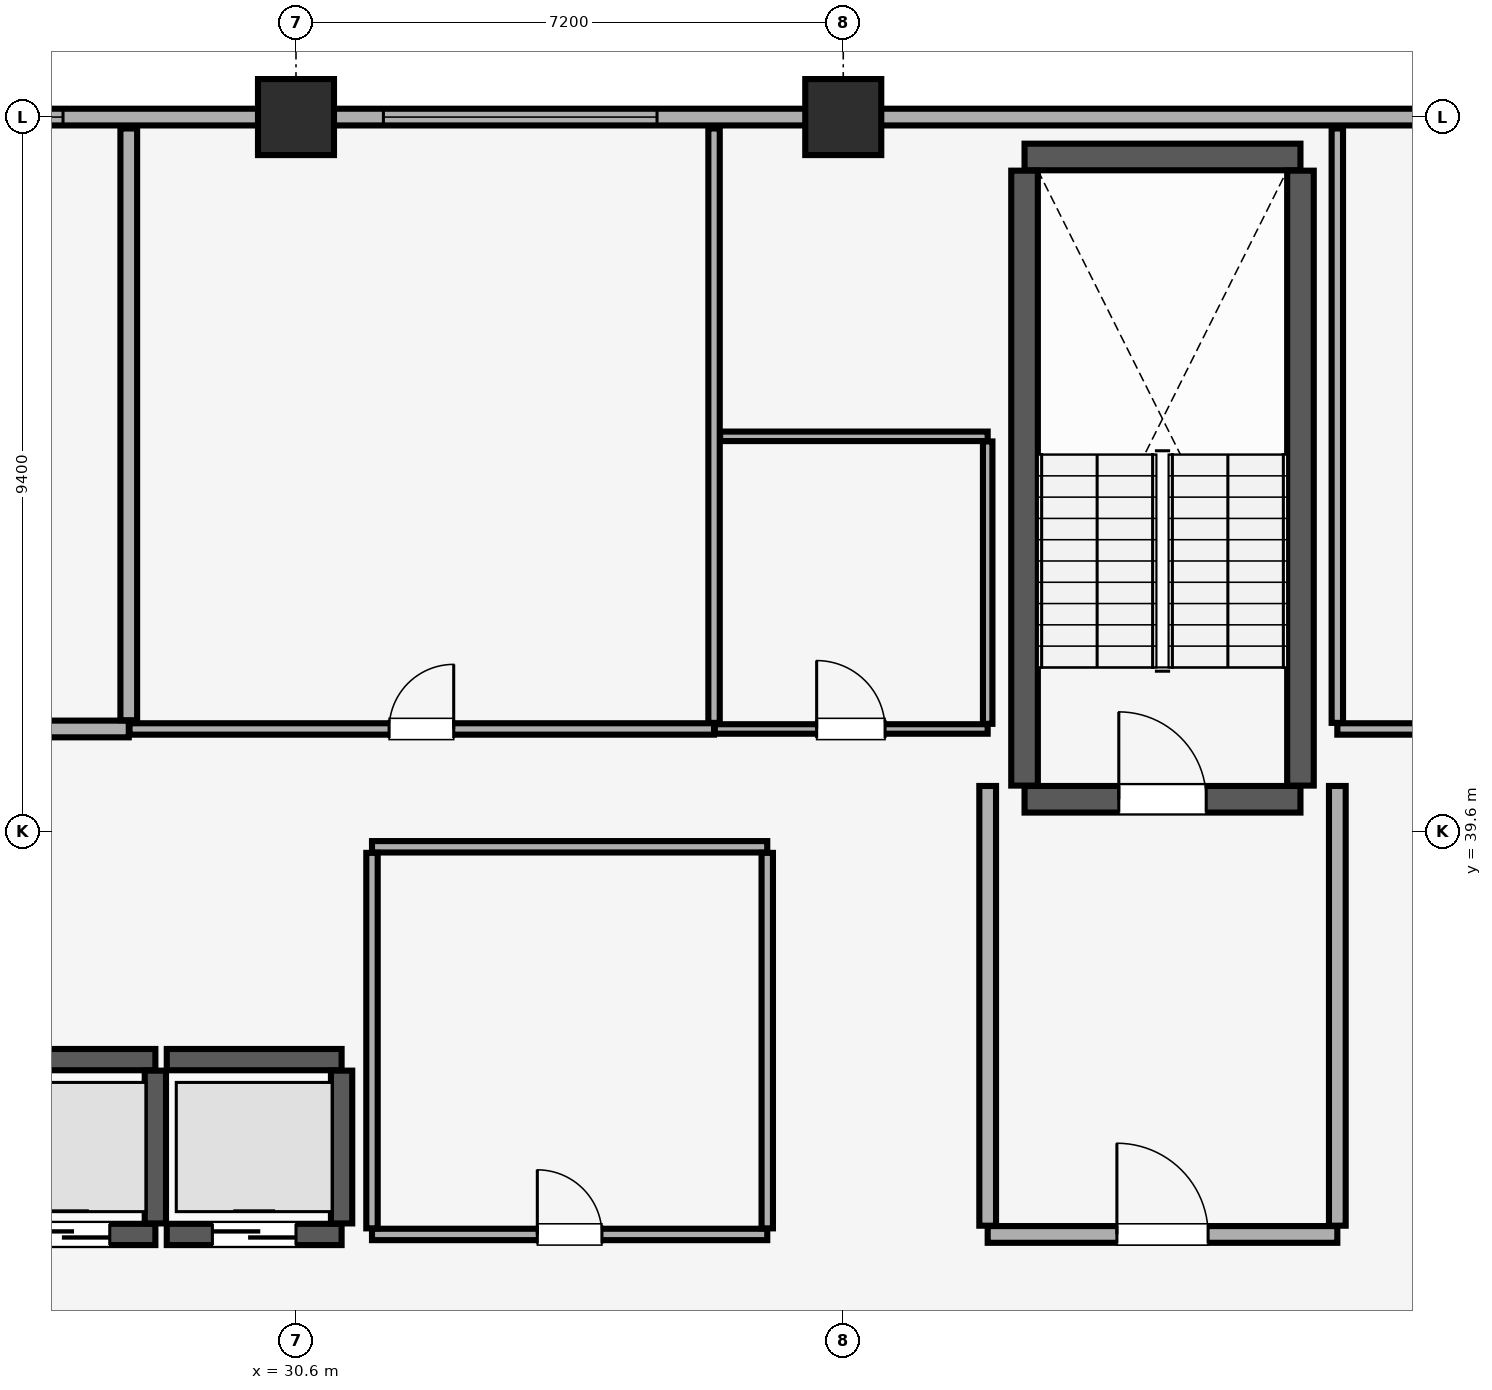
"""IFC4 building model, lengths in metres.
Left out: names, types, materials, properties, quantities, classifications, styles, units other than length and angle.
Written with IfcOpenShell. Run it as: python <this file> out.ifc"""

import sys

from ifc_helpers import new_model, si_unit, direction, frame, frame_2d, origin, origin_2d, place, context, subcontext, project, spatial, rectangle, extrude, element, fill, save


model = new_model("IFC4")
c1 = context("Model", 3, precision=1e-05, world=origin(), true_north=direction((0.0, 1.0)))
c2 = subcontext(c1, "Body", "Model", "MODEL_VIEW")
j1 = project(units=[si_unit("LENGTHUNIT", "METRE"), si_unit("PLANEANGLEUNIT", "RADIAN")], contexts=[c1])
p1 = place(None, origin())
s1 = spatial("IfcSite", under=j1, at=p1, CompositionType="ELEMENT")
p2 = place(p1, origin())
s2 = spatial("IfcBuilding", under=s1, at=p2, CompositionType="ELEMENT")
p3 = place(p2, frame((0.0, 0.0, 276.55)))
s3 = spatial("IfcBuildingStorey", under=s2, at=p3, CompositionType="ELEMENT", Elevation=276.55)
for number, where, z_axis, x_axis in (
    (1, (30.6, 49.0, 0.0), (0.0, 0.0, 1.0), (1.0, 0.0, 0.0)),
    (2, (37.8, 49.0, 0.0), (0.0, 0.0, 1.0), (1.0, 0.0, 0.0)),
):
    element("IfcColumn", number, at=place(p3, frame(where, z_axis=z_axis, x_axis=x_axis)), inside=s3, PredefinedType="COLUMN", context=c2, shape_type="SweptSolid", body=[
        extrude(rectangle(XDim=1.0, YDim=1.0, at=origin_2d()), origin(), (0.0, 0.0, 1.0), 3.6),
    ])
p4 = place(p3, frame((74.2, 49.0, 0.0), z_axis=(0.0, 0.0, 1.0), x_axis=(-1.0, 0.0, 0.0)))
e3 = element("IfcWall", 3, at=p4, inside=s3, PredefinedType="SOLIDWALL", context=c2, shape_type="SweptSolid", body=[
    extrude(rectangle(XDim=64.4, YDim=0.22, at=frame_2d((32.2, 0.0))), origin(), (0.0, 0.0, 1.0), 2.8),
])
p5 = place(p4, frame((59.815, 0.0, 0.85)))
e4 = element("IfcOpeningElement", 4, at=p5, cuts=e3, PredefinedType="OPENING", context=c2, shape_type="SweptSolid", body=[
    extrude(rectangle(XDim=3.0, YDim=1.5, at=frame_2d((1.5, 0.75))), frame((0.0, 0.12, 0.0), z_axis=(0.0, -1.0, 0.0), x_axis=(1.0, 0.0, 0.0)), (0.0, 0.0, 1.0), 0.24),
])
p6 = place(p4, frame((1.585, 0.0, 0.85)))
e5 = element("IfcOpeningElement", 5, at=p6, cuts=e3, PredefinedType="OPENING", context=c2, shape_type="SweptSolid", body=[
    extrude(rectangle(XDim=3.0, YDim=1.5, at=frame_2d((1.5, 0.75))), frame((0.0, 0.12, 0.0), z_axis=(0.0, -1.0, 0.0), x_axis=(1.0, 0.0, 0.0)), (0.0, 0.0, 1.0), 0.24),
])
p7 = place(p4, frame((46.665, 0.0, 0.9)))
e6 = element("IfcOpeningElement", 6, at=p7, cuts=e3, PredefinedType="OPENING", context=c2, shape_type="SweptSolid", body=[
    extrude(rectangle(XDim=1.5, YDim=1.4, at=frame_2d((0.75, 0.7))), frame((0.0, 0.12, 0.0), z_axis=(0.0, -1.0, 0.0), x_axis=(1.0, 0.0, 0.0)), (0.0, 0.0, 1.0), 0.24),
])
p8 = place(p4, frame((38.85, 0.0, 0.9)))
e7 = element("IfcOpeningElement", 7, at=p8, cuts=e3, PredefinedType="OPENING", context=c2, shape_type="SweptSolid", body=[
    extrude(rectangle(XDim=3.6, YDim=1.5, at=frame_2d((1.8, 0.75))), frame((0.0, 0.12, 0.0), z_axis=(0.0, -1.0, 0.0), x_axis=(1.0, 0.0, 0.0)), (0.0, 0.0, 1.0), 0.24),
])
p9 = place(p4, frame((25.45, 0.0, 0.9)))
e8 = element("IfcOpeningElement", 8, at=p9, cuts=e3, PredefinedType="OPENING", context=c2, shape_type="SweptSolid", body=[
    extrude(rectangle(XDim=1.5, YDim=1.4, at=frame_2d((0.75, 0.7))), frame((0.0, 0.12, 0.0), z_axis=(0.0, -1.0, 0.0), x_axis=(1.0, 0.0, 0.0)), (0.0, 0.0, 1.0), 0.24),
])
p10 = place(p4, frame((21.8, 0.0, 0.9)))
e9 = element("IfcOpeningElement", 9, at=p10, cuts=e3, PredefinedType="OPENING", context=c2, shape_type="SweptSolid", body=[
    extrude(rectangle(XDim=2.4, YDim=1.5, at=frame_2d((1.2, 0.75))), frame((0.0, 0.12, 0.0), z_axis=(0.0, -1.0, 0.0), x_axis=(1.0, 0.0, 0.0)), (0.0, 0.0, 1.0), 0.24),
])
p11 = place(p4, frame((17.435, 0.0, 0.9)))
e10 = element("IfcOpeningElement", 10, at=p11, cuts=e3, PredefinedType="OPENING", context=c2, shape_type="SweptSolid", body=[
    extrude(rectangle(XDim=2.4, YDim=1.5, at=frame_2d((1.2, 0.75))), frame((0.0, 0.12, 0.0), z_axis=(0.0, -1.0, 0.0), x_axis=(1.0, 0.0, 0.0)), (0.0, 0.0, 1.0), 0.24),
])
p12 = place(p3, frame((40.185, 40.025, 0.0), z_axis=(0.0, 0.0, 1.0), x_axis=(1.0, 0.0, 0.0)))
e11 = element("IfcWall", 11, at=p12, inside=s3, PredefinedType="SHEAR", context=c2, shape_type="SweptSolid", body=[
    extrude(rectangle(XDim=3.63, YDim=0.35, at=frame_2d((1.815, 0.0))), origin(), (0.0, 0.0, 1.0), 3.6),
])
p13 = place(p12, frame((1.24, 0.0, 0.0)))
e12 = element("IfcOpeningElement", 12, at=p13, cuts=e11, PredefinedType="OPENING", context=c2, shape_type="SweptSolid", body=[
    extrude(rectangle(XDim=1.15, YDim=2.15, at=frame_2d((0.575, 1.075))), frame((0.0, 0.185, 0.0), z_axis=(0.0, -1.0, 0.0), x_axis=(1.0, 0.0, 0.0)), (0.0, 0.0, 1.0), 0.37),
])
p14 = place(p3, frame((40.185, 48.475, 0.0), z_axis=(0.0, 0.0, 1.0), x_axis=(1.0, 0.0, 0.0)))
e13 = element("IfcWall", 13, at=p14, inside=s3, PredefinedType="SHEAR", context=c2, shape_type="SweptSolid", body=[
    extrude(rectangle(XDim=3.63, YDim=0.35, at=frame_2d((1.815, 0.0))), origin(), (0.0, 0.0, 1.0), 3.6),
])
for number, where, z_axis, x_axis in (
    (14, (40.185, 40.205, 0.0), (0.0, 0.0, 1.0), (0.0, 1.0, 0.0)),
    (15, (43.815, 40.205, 0.0), (0.0, 0.0, 1.0), (0.0, 1.0, 0.0)),
):
    element("IfcWall", number, at=place(p3, frame(where, z_axis=z_axis, x_axis=x_axis)), inside=s3, PredefinedType="SHEAR", context=c2, shape_type="SweptSolid", body=[
        extrude(rectangle(XDim=8.09, YDim=0.35, at=frame_2d((4.045, 0.0))), origin(), (0.0, 0.0, 1.0), 3.6),
    ])
p15 = place(p3, frame((26.45, 34.3, 0.0), z_axis=(0.0, 0.0, 1.0), x_axis=(1.0, 0.0, 0.0)))
e16 = element("IfcWall", 16, at=p15, inside=s3, PredefinedType="SHEAR", context=c2, shape_type="SweptSolid", body=[
    extrude(rectangle(XDim=2.3, YDim=0.28, at=frame_2d((1.15, 0.0))), origin(), (0.0, 0.0, 1.0), 3.6),
])
p16 = place(p15, frame((0.6, 0.0, 0.0)))
e17 = element("IfcOpeningElement", 17, at=p16, cuts=e16, PredefinedType="OPENING", context=c2, shape_type="SweptSolid", body=[
    extrude(rectangle(XDim=1.1, YDim=2.2, at=frame_2d((0.55, 1.1))), frame((0.0, 0.15, 0.0), z_axis=(0.0, -1.0, 0.0), x_axis=(1.0, 0.0, 0.0)), (0.0, 0.0, 1.0), 0.3),
])
p17 = place(p3, frame((26.45, 36.6, 0.0), z_axis=(0.0, 0.0, 1.0), x_axis=(1.0, 0.0, 0.0)))
e18 = element("IfcWall", 18, at=p17, inside=s3, PredefinedType="SHEAR", context=c2, shape_type="SweptSolid", body=[
    extrude(rectangle(XDim=2.3, YDim=0.28, at=frame_2d((1.15, 0.0))), origin(), (0.0, 0.0, 1.0), 3.6),
])
p18 = place(p3, frame((28.75, 34.445, 0.0), z_axis=(0.0, 0.0, 1.0), x_axis=(0.0, 1.0, 0.0)))
e19 = element("IfcWall", 19, at=p18, inside=s3, PredefinedType="SHEAR", context=c2, shape_type="SweptSolid", body=[
    extrude(rectangle(XDim=2.01, YDim=0.28, at=frame_2d((1.005, 0.0))), origin(), (0.0, 0.0, 1.0), 3.6),
])
p19 = place(p3, frame((28.9, 34.3, 0.0), z_axis=(0.0, 0.0, 1.0), x_axis=(1.0, 0.0, 0.0)))
e20 = element("IfcWall", 20, at=p19, inside=s3, PredefinedType="SHEAR", context=c2, shape_type="SweptSolid", body=[
    extrude(rectangle(XDim=2.3, YDim=0.28, at=frame_2d((1.15, 0.0))), origin(), (0.0, 0.0, 1.0), 3.6),
])
p20 = place(p19, frame((0.6, 0.0, 0.0)))
e21 = element("IfcOpeningElement", 21, at=p20, cuts=e20, PredefinedType="OPENING", context=c2, shape_type="SweptSolid", body=[
    extrude(rectangle(XDim=1.1, YDim=2.2, at=frame_2d((0.55, 1.1))), frame((0.0, 0.15, 0.0), z_axis=(0.0, -1.0, 0.0), x_axis=(1.0, 0.0, 0.0)), (0.0, 0.0, 1.0), 0.3),
])
p21 = place(p3, frame((28.9, 36.6, 0.0), z_axis=(0.0, 0.0, 1.0), x_axis=(1.0, 0.0, 0.0)))
e22 = element("IfcWall", 22, at=p21, inside=s3, PredefinedType="SHEAR", context=c2, shape_type="SweptSolid", body=[
    extrude(rectangle(XDim=2.3, YDim=0.28, at=frame_2d((1.15, 0.0))), origin(), (0.0, 0.0, 1.0), 3.6),
])
p22 = place(p3, frame((31.2, 34.445, 0.0), z_axis=(0.0, 0.0, 1.0), x_axis=(0.0, 1.0, 0.0)))
e23 = element("IfcWall", 23, at=p22, inside=s3, PredefinedType="SHEAR", context=c2, shape_type="SweptSolid", body=[
    extrude(rectangle(XDim=2.01, YDim=0.28, at=frame_2d((1.005, 0.0))), origin(), (0.0, 0.0, 1.0), 3.6),
])
p23 = place(p3, frame((39.7, 34.3, 0.0), z_axis=(0.0, 0.0, 1.0), x_axis=(1.0, 0.0, 0.0)))
e24 = element("IfcWall", 24, at=p23, inside=s3, PredefinedType="PARTITIONING", context=c2, shape_type="SweptSolid", body=[
    extrude(rectangle(XDim=4.6, YDim=0.22, at=frame_2d((2.3, 0.0))), origin(), (0.0, 0.0, 1.0), 3.6),
])
p24 = place(p23, frame((1.7, 0.0, 0.0)))
e25 = element("IfcOpeningElement", 25, at=p24, cuts=e24, PredefinedType="OPENING", context=c2, shape_type="SweptSolid", body=[
    extrude(rectangle(XDim=1.2, YDim=2.15, at=frame_2d((0.6, 1.075))), frame((0.0, 0.12, 0.0), z_axis=(0.0, -1.0, 0.0), x_axis=(1.0, 0.0, 0.0)), (0.0, 0.0, 1.0), 0.24),
])
for number, where, z_axis, x_axis in (
    (26, (39.7, 34.415, 0.0), (0.0, 0.0, 1.0), (0.0, 1.0, 0.0)),
    (27, (44.3, 34.415, 0.0), (0.0, 0.0, 1.0), (0.0, 1.0, 0.0)),
):
    element("IfcWall", number, at=place(p3, frame(where, z_axis=z_axis, x_axis=x_axis)), inside=s3, PredefinedType="PARTITIONING", context=c2, shape_type="SweptSolid", body=[
        extrude(rectangle(XDim=5.785, YDim=0.22, at=frame_2d((2.893, 0.0))), origin(), (0.0, 0.0, 1.0), 3.6),
    ])
p25 = place(p3, frame((31.6, 34.3, 0.0), z_axis=(0.0, 0.0, 1.0), x_axis=(1.0, 0.0, 0.0)))
e28 = element("IfcWall", 28, at=p25, inside=s3, PredefinedType="PARTITIONING", context=c2, shape_type="SweptSolid", body=[
    extrude(rectangle(XDim=5.2, YDim=0.15, at=frame_2d((2.6, 0.0))), origin(), (0.0, 0.0, 1.0), 3.6),
])
p26 = place(p25, frame((2.175, 0.0, 0.0)))
e29 = element("IfcOpeningElement", 29, at=p26, cuts=e28, PredefinedType="OPENING", context=c2, shape_type="SweptSolid", body=[
    extrude(rectangle(XDim=0.85, YDim=2.1, at=frame_2d((0.425, 1.05))), frame((0.0, 0.085, 0.0), z_axis=(0.0, -1.0, 0.0), x_axis=(1.0, 0.0, 0.0)), (0.0, 0.0, 1.0), 0.17),
])
p27 = place(p3, frame((31.6, 39.4, 0.0), z_axis=(0.0, 0.0, 1.0), x_axis=(1.0, 0.0, 0.0)))
e30 = element("IfcWall", 30, at=p27, inside=s3, PredefinedType="PARTITIONING", context=c2, shape_type="SweptSolid", body=[
    extrude(rectangle(XDim=5.2, YDim=0.15, at=frame_2d((2.6, 0.0))), origin(), (0.0, 0.0, 1.0), 3.6),
])
for number, where, z_axis, x_axis in (
    (31, (31.6, 34.38, 0.0), (0.0, 0.0, 1.0), (0.0, 1.0, 0.0)),
    (32, (36.8, 34.38, 0.0), (0.0, 0.0, 1.0), (0.0, 1.0, 0.0)),
):
    element("IfcWall", number, at=place(p3, frame(where, z_axis=z_axis, x_axis=x_axis)), inside=s3, PredefinedType="PARTITIONING", context=c2, shape_type="SweptSolid", body=[
        extrude(rectangle(XDim=4.94, YDim=0.15, at=frame_2d((2.47, 0.0))), origin(), (0.0, 0.0, 1.0), 3.6),
    ])
p28 = place(p3, frame((25.0, 40.95, 0.0), z_axis=(0.0, 0.0, 1.0), x_axis=(1.0, 0.0, 0.0)))
e33 = element("IfcWall", 33, at=p28, inside=s3, PredefinedType="PARTITIONING", context=c2, shape_type="SweptSolid", body=[
    extrude(rectangle(XDim=3.4, YDim=0.22, at=frame_2d((1.7, 0.0))), origin(), (0.0, 0.0, 1.0), 3.6),
])
p29 = place(p28, frame((1.275, 0.0, 0.0)))
e34 = element("IfcOpeningElement", 34, at=p29, cuts=e33, PredefinedType="OPENING", context=c2, shape_type="SweptSolid", body=[
    extrude(rectangle(XDim=0.85, YDim=2.1, at=frame_2d((0.425, 1.05))), frame((0.0, 0.12, 0.0), z_axis=(0.0, -1.0, 0.0), x_axis=(1.0, 0.0, 0.0)), (0.0, 0.0, 1.0), 0.24),
])
p30 = place(p3, frame((28.4, 41.065, 0.0), z_axis=(0.0, 0.0, 1.0), x_axis=(0.0, 1.0, 0.0)))
e35 = element("IfcWall", 35, at=p30, inside=s3, PredefinedType="PARTITIONING", context=c2, shape_type="SweptSolid", body=[
    extrude(rectangle(XDim=7.785, YDim=0.22, at=frame_2d((3.893, 0.0))), origin(), (0.0, 0.0, 1.0), 3.6),
])
p31 = place(p3, frame((28.41, 40.95, 0.0), z_axis=(0.0, 0.0, 1.0), x_axis=(1.0, 0.0, 0.0)))
e36 = element("IfcWall", 36, at=p31, inside=s3, PredefinedType="PARTITIONING", context=c2, shape_type="SweptSolid", body=[
    extrude(rectangle(XDim=7.69, YDim=0.15, at=frame_2d((3.845, 0.0))), origin(), (0.0, 0.0, 1.0), 3.6),
])
p32 = place(p31, frame((3.415, 0.0, 0.0)))
e37 = element("IfcOpeningElement", 37, at=p32, cuts=e36, PredefinedType="OPENING", context=c2, shape_type="SweptSolid", body=[
    extrude(rectangle(XDim=0.85, YDim=2.1, at=frame_2d((0.425, 1.05))), frame((0.0, 0.085, 0.0), z_axis=(0.0, -1.0, 0.0), x_axis=(1.0, 0.0, 0.0)), (0.0, 0.0, 1.0), 0.17),
])
p33 = place(p3, frame((36.1, 41.03, 0.0), z_axis=(0.0, 0.0, 1.0), x_axis=(0.0, 1.0, 0.0)))
e38 = element("IfcWall", 38, at=p33, inside=s3, PredefinedType="PARTITIONING", context=c2, shape_type="SweptSolid", body=[
    extrude(rectangle(XDim=7.82, YDim=0.15, at=frame_2d((3.91, 0.0))), origin(), (0.0, 0.0, 1.0), 3.6),
])
p34 = place(p3, frame((36.11, 40.95, 0.0), z_axis=(0.0, 0.0, 1.0), x_axis=(1.0, 0.0, 0.0)))
e39 = element("IfcWall", 39, at=p34, inside=s3, PredefinedType="PARTITIONING", context=c2, shape_type="SweptSolid", body=[
    extrude(rectangle(XDim=3.59, YDim=0.125, at=frame_2d((1.795, 0.0))), origin(), (0.0, 0.0, 1.0), 3.6),
])
p35 = place(p34, frame((1.34, 0.0, 0.0)))
e40 = element("IfcOpeningElement", 40, at=p35, cuts=e39, PredefinedType="OPENING", context=c2, shape_type="SweptSolid", body=[
    extrude(rectangle(XDim=0.9, YDim=2.1, at=frame_2d((0.45, 1.05))), frame((0.0, 0.073, 0.0), z_axis=(0.0, -1.0, 0.0), x_axis=(1.0, 0.0, 0.0)), (0.0, 0.0, 1.0), 0.145),
])
p36 = place(p3, frame((36.18, 44.8, 0.0), z_axis=(0.0, 0.0, 1.0), x_axis=(1.0, 0.0, 0.0)))
e41 = element("IfcWall", 41, at=p36, inside=s3, PredefinedType="PARTITIONING", context=c2, shape_type="SweptSolid", body=[
    extrude(rectangle(XDim=3.52, YDim=0.125, at=frame_2d((1.76, 0.0))), origin(), (0.0, 0.0, 1.0), 3.6),
])
p37 = place(p3, frame((39.7, 41.018, 0.0), z_axis=(0.0, 0.0, 1.0), x_axis=(0.0, 1.0, 0.0)))
e42 = element("IfcWall", 42, at=p37, inside=s3, PredefinedType="PARTITIONING", context=c2, shape_type="SweptSolid", body=[
    extrude(rectangle(XDim=3.715, YDim=0.125, at=frame_2d((1.857, 0.0))), origin(), (0.0, 0.0, 1.0), 3.6),
])
p38 = place(p3, frame((44.3, 40.95, 0.0), z_axis=(0.0, 0.0, 1.0), x_axis=(1.0, 0.0, 0.0)))
e43 = element("IfcWall", 43, at=p38, inside=s3, PredefinedType="PARTITIONING", context=c2, shape_type="SweptSolid", body=[
    extrude(rectangle(XDim=5.1, YDim=0.15, at=frame_2d((2.55, 0.0))), origin(), (0.0, 0.0, 1.0), 3.6),
])
p39 = place(p38, frame((2.875, 0.0, 0.0)))
e44 = element("IfcOpeningElement", 44, at=p39, cuts=e43, PredefinedType="OPENING", context=c2, shape_type="SweptSolid", body=[
    extrude(rectangle(XDim=0.85, YDim=2.1, at=frame_2d((0.425, 1.05))), frame((0.0, 0.085, 0.0), z_axis=(0.0, -1.0, 0.0), x_axis=(1.0, 0.0, 0.0)), (0.0, 0.0, 1.0), 0.17),
])
p40 = place(p3, frame((44.3, 41.03, 0.0), z_axis=(0.0, 0.0, 1.0), x_axis=(0.0, 1.0, 0.0)))
e45 = element("IfcWall", 45, at=p40, inside=s3, PredefinedType="PARTITIONING", context=c2, shape_type="SweptSolid", body=[
    extrude(rectangle(XDim=7.82, YDim=0.15, at=frame_2d((3.91, 0.0))), origin(), (0.0, 0.0, 1.0), 3.6),
])
p41 = place(p7, origin())
e46 = element("IfcWindow", 46, at=p41, inside=s3, PartitioningType="SINGLE_PANEL", PredefinedType="WINDOW", context=c2, shape_type="SweptSolid", body=[
    extrude(rectangle(XDim=1.5, YDim=1.4, at=frame_2d((0.75, 0.7))), frame((0.0, 0.03, 0.0), z_axis=(0.0, -1.0, 0.0), x_axis=(1.0, 0.0, 0.0)), (0.0, 0.0, 1.0), 0.06),
])
fill(e6, e46)
p42 = place(p8, origin())
e47 = element("IfcWindow", 47, at=p42, inside=s3, PartitioningType="SINGLE_PANEL", PredefinedType="WINDOW", context=c2, shape_type="SweptSolid", body=[
    extrude(rectangle(XDim=3.6, YDim=1.5, at=frame_2d((1.8, 0.75))), frame((0.0, 0.03, 0.0), z_axis=(0.0, -1.0, 0.0), x_axis=(1.0, 0.0, 0.0)), (0.0, 0.0, 1.0), 0.06),
])
fill(e7, e47)
p43 = place(p13, origin())
e48 = element("IfcDoor", 48, at=p43, inside=s3, OperationType="SINGLE_SWING_LEFT", PredefinedType="DOOR", context=c2, shape_type="SweptSolid", body=[
    extrude(rectangle(XDim=1.15, YDim=2.15, at=frame_2d((0.575, 1.075))), frame((0.0, 0.025, 0.0), z_axis=(0.0, -1.0, 0.0), x_axis=(1.0, 0.0, 0.0)), (0.0, 0.0, 1.0), 0.05),
])
fill(e12, e48)
p44 = place(p16, origin())
e49 = element("IfcDoor", 49, at=p44, inside=s3, OperationType="DOUBLE_DOOR_SLIDING", PredefinedType="DOOR", context=c2, shape_type="SweptSolid", body=[
    extrude(rectangle(XDim=1.1, YDim=2.2, at=frame_2d((0.55, 1.1))), frame((0.0, 0.025, 0.0), z_axis=(0.0, -1.0, 0.0), x_axis=(1.0, 0.0, 0.0)), (0.0, 0.0, 1.0), 0.05),
])
fill(e17, e49)
p45 = place(p20, origin())
e50 = element("IfcDoor", 50, at=p45, inside=s3, OperationType="DOUBLE_DOOR_SLIDING", PredefinedType="DOOR", context=c2, shape_type="SweptSolid", body=[
    extrude(rectangle(XDim=1.1, YDim=2.2, at=frame_2d((0.55, 1.1))), frame((0.0, 0.025, 0.0), z_axis=(0.0, -1.0, 0.0), x_axis=(1.0, 0.0, 0.0)), (0.0, 0.0, 1.0), 0.05),
])
fill(e21, e50)
p46 = place(p24, origin())
e51 = element("IfcDoor", 51, at=p46, inside=s3, OperationType="SINGLE_SWING_LEFT", PredefinedType="DOOR", context=c2, shape_type="SweptSolid", body=[
    extrude(rectangle(XDim=1.2, YDim=2.15, at=frame_2d((0.6, 1.075))), frame((0.0, 0.025, 0.0), z_axis=(0.0, -1.0, 0.0), x_axis=(1.0, 0.0, 0.0)), (0.0, 0.0, 1.0), 0.05),
])
fill(e25, e51)
p47 = place(p26, origin())
e52 = element("IfcDoor", 52, at=p47, inside=s3, OperationType="SINGLE_SWING_LEFT", PredefinedType="DOOR", context=c2, shape_type="SweptSolid", body=[
    extrude(rectangle(XDim=0.85, YDim=2.1, at=frame_2d((0.425, 1.05))), frame((0.0, 0.025, 0.0), z_axis=(0.0, -1.0, 0.0), x_axis=(1.0, 0.0, 0.0)), (0.0, 0.0, 1.0), 0.05),
])
fill(e29, e52)
p48 = place(p32, origin())
e53 = element("IfcDoor", 53, at=p48, inside=s3, OperationType="SINGLE_SWING_RIGHT", PredefinedType="DOOR", context=c2, shape_type="SweptSolid", body=[
    extrude(rectangle(XDim=0.85, YDim=2.1, at=frame_2d((0.425, 1.05))), frame((0.0, 0.025, 0.0), z_axis=(0.0, -1.0, 0.0), x_axis=(1.0, 0.0, 0.0)), (0.0, 0.0, 1.0), 0.05),
])
fill(e37, e53)
p49 = place(p35, origin())
e54 = element("IfcDoor", 54, at=p49, inside=s3, OperationType="SINGLE_SWING_LEFT", PredefinedType="DOOR", context=c2, shape_type="SweptSolid", body=[
    extrude(rectangle(XDim=0.9, YDim=2.1, at=frame_2d((0.45, 1.05))), frame((0.0, 0.025, 0.0), z_axis=(0.0, -1.0, 0.0), x_axis=(1.0, 0.0, 0.0)), (0.0, 0.0, 1.0), 0.05),
])
fill(e40, e54)
save(model, sys.argv[1])
